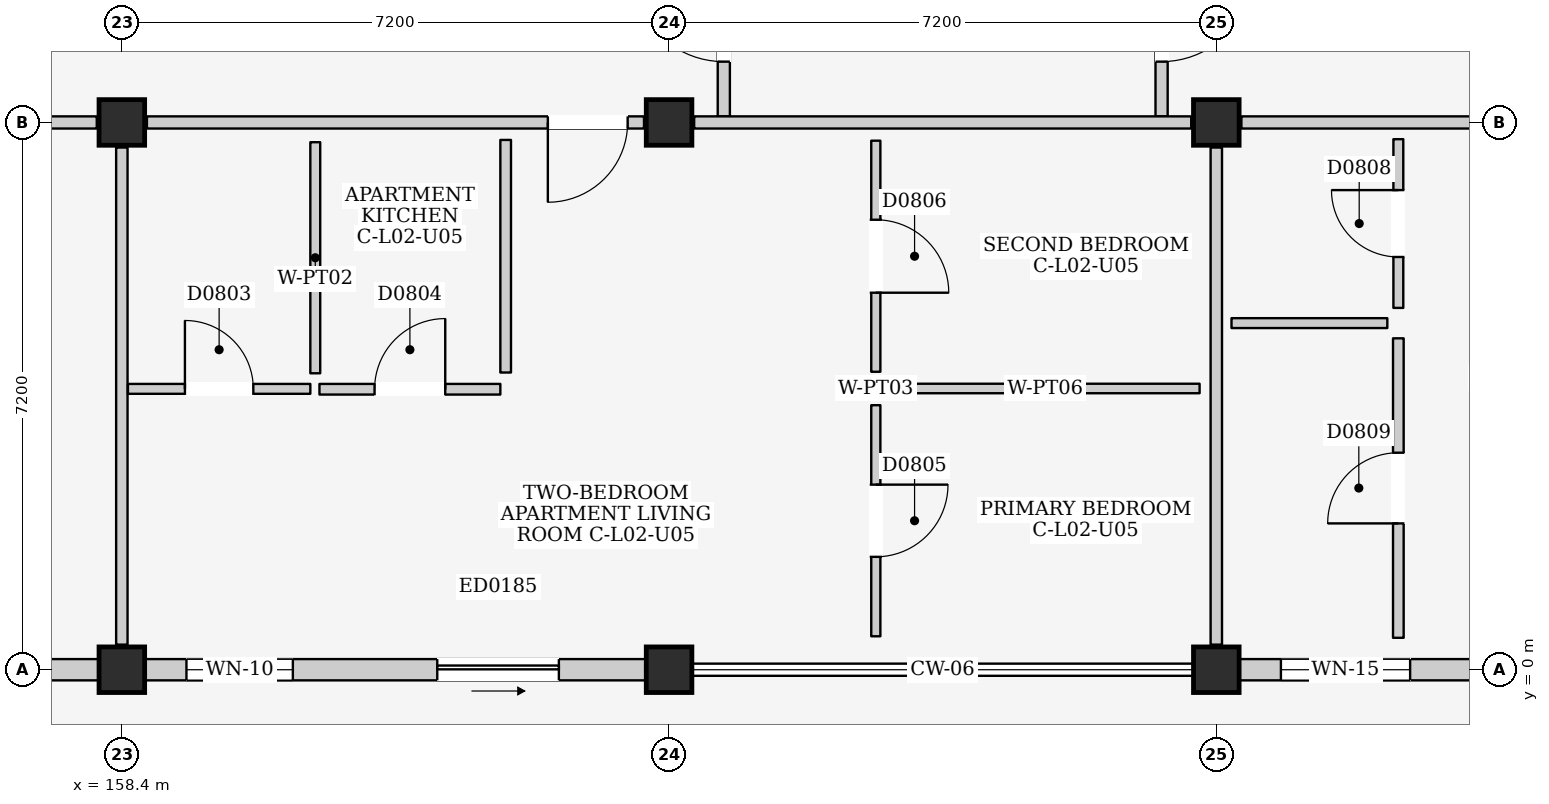
"""IFC4 building model, lengths in metres.
Left out: names, types, materials, properties, quantities, classifications, styles, units other than length and angle.
Written with IfcOpenShell. Run it as: python <this file> out.ifc"""

import sys

from ifc_helpers import new_model, si_unit, direction, frame, frame_2d, origin, origin_2d, place, context, subcontext, project, spatial, rectangle, extrude, element, fill, save


model = new_model("IFC4")
c1 = context("Model", 3, precision=1e-05, world=origin(), true_north=direction((0.0, 1.0)))
c2 = subcontext(c1, "Body", "Model", "MODEL_VIEW")
j1 = project(units=[si_unit("LENGTHUNIT", "METRE"), si_unit("PLANEANGLEUNIT", "RADIAN")], contexts=[c1])
p1 = place(None, origin())
s1 = spatial("IfcSite", under=j1, at=p1, CompositionType="ELEMENT")
p2 = place(p1, origin())
s2 = spatial("IfcBuilding", under=s1, at=p2, CompositionType="ELEMENT")
p3 = place(p2, frame((0.0, 0.0, 9.0)))
s3 = spatial("IfcBuildingStorey", under=s2, at=p3, CompositionType="ELEMENT", Elevation=9.0)
for number, where, z_axis, x_axis in (
    (1, (158.4, 0.0, 0.0), (0.0, 0.0, 1.0), (1.0, 0.0, 0.0)),
    (2, (158.4, 7.2, 0.0), (0.0, 0.0, 1.0), (1.0, 0.0, 0.0)),
    (3, (165.6, 0.0, 0.0), (0.0, 0.0, 1.0), (1.0, 0.0, 0.0)),
    (4, (165.6, 7.2, 0.0), (0.0, 0.0, 1.0), (1.0, 0.0, 0.0)),
    (5, (172.8, 0.0, 0.0), (0.0, 0.0, 1.0), (1.0, 0.0, 0.0)),
    (6, (172.8, 7.2, 0.0), (0.0, 0.0, 1.0), (1.0, 0.0, 0.0)),
):
    element("IfcColumn", number, at=place(p3, frame(where, z_axis=z_axis, x_axis=x_axis)), inside=s3, PredefinedType="COLUMN", context=c2, shape_type="SweptSolid", body=[
        extrude(rectangle(XDim=0.6, YDim=0.6, at=origin_2d()), origin(), (0.0, 0.0, 1.0), 3.2),
    ])
p4 = place(p3, frame((151.5, 0.0, 0.0), z_axis=(0.0, 0.0, 1.0), x_axis=(1.0, 0.0, 0.0)))
e7 = element("IfcWall", 7, at=p4, inside=s3, PredefinedType="ELEMENTEDWALL", context=c2, shape_type="SweptSolid", body=[
    extrude(rectangle(XDim=6.6, YDim=0.28, at=frame_2d((3.3, 0.0))), origin(), (0.0, 0.0, 1.0), 2.425),
])
p5 = place(p4, frame((3.85, 0.0, 0.0)))
e8 = element("IfcOpeningElement", 8, at=p5, cuts=e7, PredefinedType="OPENING", context=c2, shape_type="SweptSolid", body=[
    extrude(rectangle(XDim=1.8, YDim=2.12, at=frame_2d((0.9, 1.06))), frame((0.0, 0.155, 0.0), z_axis=(0.0, -1.0, 0.0), x_axis=(1.0, 0.0, 0.0)), (0.0, 0.0, 1.0), 0.31),
])
p6 = place(p4, frame((0.55, 0.0, 0.665)))
e9 = element("IfcOpeningElement", 9, at=p6, cuts=e7, PredefinedType="OPENING", context=c2, shape_type="SweptSolid", body=[
    extrude(rectangle(XDim=2.1, YDim=1.65, at=frame_2d((1.05, 0.825))), frame((0.0, 0.155, 0.0), z_axis=(0.0, -1.0, 0.0), x_axis=(1.0, 0.0, 0.0)), (0.0, 0.0, 1.0), 0.31),
])
p7 = place(p3, frame((158.7, 0.0, 0.0), z_axis=(0.0, 0.0, 1.0), x_axis=(1.0, 0.0, 0.0)))
e10 = element("IfcWall", 10, at=p7, inside=s3, PredefinedType="ELEMENTEDWALL", context=c2, shape_type="SweptSolid", body=[
    extrude(rectangle(XDim=6.6, YDim=0.28, at=frame_2d((3.3, 0.0))), origin(), (0.0, 0.0, 1.0), 2.425),
])
p8 = place(p7, frame((3.85, 0.0, 0.0)))
e11 = element("IfcOpeningElement", 11, at=p8, cuts=e10, PredefinedType="OPENING", context=c2, shape_type="SweptSolid", body=[
    extrude(rectangle(XDim=1.6, YDim=2.12, at=frame_2d((0.8, 1.06))), frame((0.0, 0.155, 0.0), z_axis=(0.0, -1.0, 0.0), x_axis=(1.0, 0.0, 0.0)), (0.0, 0.0, 1.0), 0.31),
])
p9 = place(p7, frame((0.55, 0.0, 0.9)))
e12 = element("IfcOpeningElement", 12, at=p9, cuts=e10, PredefinedType="OPENING", context=c2, shape_type="SweptSolid", body=[
    extrude(rectangle(XDim=1.4, YDim=1.2, at=frame_2d((0.7, 0.6))), frame((0.0, 0.155, 0.0), z_axis=(0.0, -1.0, 0.0), x_axis=(1.0, 0.0, 0.0)), (0.0, 0.0, 1.0), 0.31),
])
p10 = place(p3, frame((173.1, 0.0, 0.0), z_axis=(0.0, 0.0, 1.0), x_axis=(1.0, 0.0, 0.0)))
e13 = element("IfcWall", 13, at=p10, inside=s3, PredefinedType="ELEMENTEDWALL", context=c2, shape_type="SweptSolid", body=[
    extrude(rectangle(XDim=6.6, YDim=0.28, at=frame_2d((3.3, 0.0))), origin(), (0.0, 0.0, 1.0), 2.425),
])
p11 = place(p10, frame((3.85, 0.0, 0.0)))
e14 = element("IfcOpeningElement", 14, at=p11, cuts=e13, PredefinedType="OPENING", context=c2, shape_type="SweptSolid", body=[
    extrude(rectangle(XDim=2.4, YDim=2.12, at=frame_2d((1.2, 1.06))), frame((0.0, 0.155, 0.0), z_axis=(0.0, -1.0, 0.0), x_axis=(1.0, 0.0, 0.0)), (0.0, 0.0, 1.0), 0.31),
])
p12 = place(p10, frame((0.55, 0.0, 0.865)))
e15 = element("IfcOpeningElement", 15, at=p12, cuts=e13, PredefinedType="OPENING", context=c2, shape_type="SweptSolid", body=[
    extrude(rectangle(XDim=1.7, YDim=1.45, at=frame_2d((0.85, 0.725))), frame((0.0, 0.155, 0.0), z_axis=(0.0, -1.0, 0.0), x_axis=(1.0, 0.0, 0.0)), (0.0, 0.0, 1.0), 0.31),
])
p13 = place(p3, frame((166.32, 7.28, 0.0), z_axis=(0.0, 0.0, 1.0), x_axis=(0.0, 1.0, 0.0)))
e16 = element("IfcWall", 16, at=p13, inside=s3, PredefinedType="PARTITIONING", context=c2, shape_type="SweptSolid", body=[
    extrude(rectangle(XDim=4.32, YDim=0.16, at=frame_2d((2.16, 0.0))), origin(), (0.0, 0.0, 1.0), 2.96),
])
p14 = place(p13, frame((0.72, 0.0, 0.0)))
e17 = element("IfcOpeningElement", 17, at=p14, cuts=e16, PredefinedType="OPENING", context=c2, shape_type="SweptSolid", body=[
    extrude(rectangle(XDim=1.2, YDim=2.2, at=frame_2d((0.6, 1.1))), frame((0.0, 0.095, 0.0), z_axis=(0.0, -1.0, 0.0), x_axis=(1.0, 0.0, 0.0)), (0.0, 0.0, 1.0), 0.19),
])
p15 = place(p3, frame((172.08, 7.28, 0.0), z_axis=(0.0, 0.0, 1.0), x_axis=(0.0, 1.0, 0.0)))
e18 = element("IfcWall", 18, at=p15, inside=s3, PredefinedType="PARTITIONING", context=c2, shape_type="SweptSolid", body=[
    extrude(rectangle(XDim=4.32, YDim=0.16, at=frame_2d((2.16, 0.0))), origin(), (0.0, 0.0, 1.0), 2.96),
])
p16 = place(p15, frame((0.72, 0.0, 0.0)))
e19 = element("IfcOpeningElement", 19, at=p16, cuts=e18, PredefinedType="OPENING", context=c2, shape_type="SweptSolid", body=[
    extrude(rectangle(XDim=1.2, YDim=2.2, at=frame_2d((0.6, 1.1))), frame((0.0, 0.095, 0.0), z_axis=(0.0, -1.0, 0.0), x_axis=(1.0, 0.0, 0.0)), (0.0, 0.0, 1.0), 0.19),
])
p17 = place(p3, frame((151.53, 7.2, 0.0), z_axis=(0.0, 0.0, 1.0), x_axis=(1.0, 0.0, 0.0)))
e20 = element("IfcWall", 20, at=p17, inside=s3, PredefinedType="PARTITIONING", context=c2, shape_type="SweptSolid", body=[
    extrude(rectangle(XDim=6.54, YDim=0.16, at=frame_2d((3.27, 0.0))), origin(), (0.0, 0.0, 1.0), 2.345),
])
p18 = place(p17, frame((4.095, 0.0, 0.0)))
e21 = element("IfcOpeningElement", 21, at=p18, cuts=e20, PredefinedType="OPENING", context=c2, shape_type="SweptSolid", body=[
    extrude(rectangle(XDim=1.05, YDim=2.15, at=frame_2d((0.525, 1.075))), frame((0.0, 0.095, 0.0), z_axis=(0.0, -1.0, 0.0), x_axis=(1.0, 0.0, 0.0)), (0.0, 0.0, 1.0), 0.19),
])
p19 = place(p3, frame((158.4, 0.33, 0.0), z_axis=(0.0, 0.0, 1.0), x_axis=(0.0, 1.0, 0.0)))
e22 = element("IfcWall", 22, at=p19, inside=s3, PredefinedType="PARTITIONING", context=c2, shape_type="SweptSolid", body=[
    extrude(rectangle(XDim=6.54, YDim=0.15, at=frame_2d((3.27, 0.0))), origin(), (0.0, 0.0, 1.0), 2.395),
])
p20 = place(p3, frame((158.73, 7.2, 0.0), z_axis=(0.0, 0.0, 1.0), x_axis=(1.0, 0.0, 0.0)))
e23 = element("IfcWall", 23, at=p20, inside=s3, PredefinedType="PARTITIONING", context=c2, shape_type="SweptSolid", body=[
    extrude(rectangle(XDim=6.54, YDim=0.16, at=frame_2d((3.27, 0.0))), origin(), (0.0, 0.0, 1.0), 2.345),
])
p21 = place(p20, frame((5.275, 0.0, 0.0)))
e24 = element("IfcOpeningElement", 24, at=p21, cuts=e23, PredefinedType="OPENING", context=c2, shape_type="SweptSolid", body=[
    extrude(rectangle(XDim=1.05, YDim=2.15, at=frame_2d((0.525, 1.075))), frame((0.0, 0.095, 0.0), z_axis=(0.0, -1.0, 0.0), x_axis=(1.0, 0.0, 0.0)), (0.0, 0.0, 1.0), 0.19),
])
p22 = place(p3, frame((165.93, 7.2, 0.0), z_axis=(0.0, 0.0, 1.0), x_axis=(1.0, 0.0, 0.0)))
e25 = element("IfcWall", 25, at=p22, inside=s3, PredefinedType="PARTITIONING", context=c2, shape_type="SweptSolid", body=[
    extrude(rectangle(XDim=6.54, YDim=0.16, at=frame_2d((3.27, 0.0))), origin(), (0.0, 0.0, 1.0), 2.345),
])
p23 = place(p3, frame((172.8, 0.33, 0.0), z_axis=(0.0, 0.0, 1.0), x_axis=(0.0, 1.0, 0.0)))
e26 = element("IfcWall", 26, at=p23, inside=s3, PredefinedType="PARTITIONING", context=c2, shape_type="SweptSolid", body=[
    extrude(rectangle(XDim=6.54, YDim=0.15, at=frame_2d((3.27, 0.0))), origin(), (0.0, 0.0, 1.0), 2.395),
])
p24 = place(p3, frame((158.48, 3.695, 0.0), z_axis=(0.0, 0.0, 1.0), x_axis=(1.0, 0.0, 0.0)))
e27 = element("IfcWall", 27, at=p24, inside=s3, PredefinedType="PARTITIONING", context=c2, shape_type="SweptSolid", body=[
    extrude(rectangle(XDim=2.4, YDim=0.13, at=frame_2d((1.2, 0.0))), origin(), (0.0, 0.0, 1.0), 2.96),
])
p25 = place(p24, frame((0.75, 0.0, 0.0)))
e28 = element("IfcOpeningElement", 28, at=p25, cuts=e27, PredefinedType="OPENING", context=c2, shape_type="SweptSolid", body=[
    extrude(rectangle(XDim=0.9, YDim=2.1, at=frame_2d((0.45, 1.05))), frame((0.0, 0.08, 0.0), z_axis=(0.0, -1.0, 0.0), x_axis=(1.0, 0.0, 0.0)), (0.0, 0.0, 1.0), 0.16),
])
p26 = place(p3, frame((160.945, 3.9, 0.0), z_axis=(0.0, 0.0, 1.0), x_axis=(0.0, 1.0, 0.0)))
e29 = element("IfcWall", 29, at=p26, inside=s3, PredefinedType="PARTITIONING", context=c2, shape_type="SweptSolid", body=[
    extrude(rectangle(XDim=3.04, YDim=0.13, at=frame_2d((1.52, 0.0))), origin(), (0.0, 0.0, 1.0), 2.96),
])
p27 = place(p3, frame((161.0, 3.69, 0.0), z_axis=(0.0, 0.0, 1.0), x_axis=(1.0, 0.0, 0.0)))
e30 = element("IfcWall", 30, at=p27, inside=s3, PredefinedType="PARTITIONING", context=c2, shape_type="SweptSolid", body=[
    extrude(rectangle(XDim=2.38, YDim=0.14, at=frame_2d((1.19, 0.0))), origin(), (0.0, 0.0, 1.0), 2.96),
])
p28 = place(p27, frame((0.725, 0.0, 0.0)))
e31 = element("IfcOpeningElement", 31, at=p28, cuts=e30, PredefinedType="OPENING", context=c2, shape_type="SweptSolid", body=[
    extrude(rectangle(XDim=0.93, YDim=2.14, at=frame_2d((0.465, 1.07))), frame((0.0, 0.085, 0.0), z_axis=(0.0, -1.0, 0.0), x_axis=(1.0, 0.0, 0.0)), (0.0, 0.0, 1.0), 0.17),
])
p29 = place(p3, frame((163.45, 3.91, 0.0), z_axis=(0.0, 0.0, 1.0), x_axis=(0.0, 1.0, 0.0)))
e32 = element("IfcWall", 32, at=p29, inside=s3, PredefinedType="PARTITIONING", context=c2, shape_type="SweptSolid", body=[
    extrude(rectangle(XDim=3.06, YDim=0.14, at=frame_2d((1.53, 0.0))), origin(), (0.0, 0.0, 1.0), 2.96),
])
p30 = place(p3, frame((168.32, 0.44, 0.0), z_axis=(0.0, 0.0, 1.0), x_axis=(0.0, 1.0, 0.0)))
e33 = element("IfcWall", 33, at=p30, inside=s3, PredefinedType="PARTITIONING", context=c2, shape_type="SweptSolid", body=[
    extrude(rectangle(XDim=3.04, YDim=0.12, at=frame_2d((1.52, 0.0))), origin(), (0.0, 0.0, 1.0), 2.96),
])
p31 = place(p30, frame((1.045, 0.0, 0.0)))
e34 = element("IfcOpeningElement", 34, at=p31, cuts=e33, PredefinedType="OPENING", context=c2, shape_type="SweptSolid", body=[
    extrude(rectangle(XDim=0.95, YDim=2.15, at=frame_2d((0.475, 1.075))), frame((0.0, 0.075, 0.0), z_axis=(0.0, -1.0, 0.0), x_axis=(1.0, 0.0, 0.0)), (0.0, 0.0, 1.0), 0.15),
])
p32 = place(p3, frame((168.52, 3.7, 0.0), z_axis=(0.0, 0.0, 1.0), x_axis=(1.0, 0.0, 0.0)))
e35 = element("IfcWall", 35, at=p32, inside=s3, PredefinedType="PARTITIONING", context=c2, shape_type="SweptSolid", body=[
    extrude(rectangle(XDim=4.06, YDim=0.125, at=frame_2d((2.03, 0.0))), origin(), (0.0, 0.0, 1.0), 2.96),
])
p33 = place(p3, frame((168.32, 3.92, 0.0), z_axis=(0.0, 0.0, 1.0), x_axis=(0.0, 1.0, 0.0)))
e36 = element("IfcWall", 36, at=p33, inside=s3, PredefinedType="PARTITIONING", context=c2, shape_type="SweptSolid", body=[
    extrude(rectangle(XDim=3.04, YDim=0.12, at=frame_2d((1.52, 0.0))), origin(), (0.0, 0.0, 1.0), 2.96),
])
p34 = place(p33, frame((1.04, 0.0, 0.0)))
e37 = element("IfcOpeningElement", 37, at=p34, cuts=e36, PredefinedType="OPENING", context=c2, shape_type="SweptSolid", body=[
    extrude(rectangle(XDim=0.96, YDim=2.15, at=frame_2d((0.48, 1.075))), frame((0.0, 0.075, 0.0), z_axis=(0.0, -1.0, 0.0), x_axis=(1.0, 0.0, 0.0)), (0.0, 0.0, 1.0), 0.15),
])
p35 = place(p3, frame((173.13, 7.2, 0.0), z_axis=(0.0, 0.0, 1.0), x_axis=(1.0, 0.0, 0.0)))
e38 = element("IfcWall", 38, at=p35, inside=s3, PredefinedType="PARTITIONING", context=c2, shape_type="SweptSolid", body=[
    extrude(rectangle(XDim=6.54, YDim=0.16, at=frame_2d((3.27, 0.0))), origin(), (0.0, 0.0, 1.0), 2.345),
])
p36 = place(p35, frame((4.095, 0.0, 0.0)))
e39 = element("IfcOpeningElement", 39, at=p36, cuts=e38, PredefinedType="OPENING", context=c2, shape_type="SweptSolid", body=[
    extrude(rectangle(XDim=1.05, YDim=2.15, at=frame_2d((0.525, 1.075))), frame((0.0, 0.095, 0.0), z_axis=(0.0, -1.0, 0.0), x_axis=(1.0, 0.0, 0.0)), (0.0, 0.0, 1.0), 0.19),
])
p37 = place(p3, frame((173.0, 4.56, 0.0), z_axis=(0.0, 0.0, 1.0), x_axis=(1.0, 0.0, 0.0)))
e40 = element("IfcWall", 40, at=p37, inside=s3, PredefinedType="PARTITIONING", context=c2, shape_type="SweptSolid", body=[
    extrude(rectangle(XDim=2.05, YDim=0.13, at=frame_2d((1.025, 0.0))), origin(), (0.0, 0.0, 1.0), 2.96),
])
p38 = place(p3, frame((175.195, 4.76, 0.0), z_axis=(0.0, 0.0, 1.0), x_axis=(0.0, 1.0, 0.0)))
e41 = element("IfcWall", 41, at=p38, inside=s3, PredefinedType="PARTITIONING", context=c2, shape_type="SweptSolid", body=[
    extrude(rectangle(XDim=2.22, YDim=0.13, at=frame_2d((1.11, 0.0))), origin(), (0.0, 0.0, 1.0), 2.96),
])
p39 = place(p38, frame((0.67, 0.0, 0.0)))
e42 = element("IfcOpeningElement", 42, at=p39, cuts=e41, PredefinedType="OPENING", context=c2, shape_type="SweptSolid", body=[
    extrude(rectangle(XDim=0.88, YDim=2.1, at=frame_2d((0.44, 1.05))), frame((0.0, 0.08, 0.0), z_axis=(0.0, -1.0, 0.0), x_axis=(1.0, 0.0, 0.0)), (0.0, 0.0, 1.0), 0.16),
])
p40 = place(p3, frame((175.195, 0.42, 0.0), z_axis=(0.0, 0.0, 1.0), x_axis=(0.0, 1.0, 0.0)))
e43 = element("IfcWall", 43, at=p40, inside=s3, PredefinedType="PARTITIONING", context=c2, shape_type="SweptSolid", body=[
    extrude(rectangle(XDim=3.94, YDim=0.14, at=frame_2d((1.97, 0.0))), origin(), (0.0, 0.0, 1.0), 2.96),
])
p41 = place(p40, frame((1.505, 0.0, 0.0)))
e44 = element("IfcOpeningElement", 44, at=p41, cuts=e43, PredefinedType="OPENING", context=c2, shape_type="SweptSolid", body=[
    extrude(rectangle(XDim=0.93, YDim=2.14, at=frame_2d((0.465, 1.07))), frame((0.0, 0.085, 0.0), z_axis=(0.0, -1.0, 0.0), x_axis=(1.0, 0.0, 0.0)), (0.0, 0.0, 1.0), 0.17),
])
p42 = place(p8, frame((1.6, 0.0, 0.0), z_axis=(0.0, 0.0, 1.0), x_axis=(-1.0, 0.0, 0.0)))
e45 = element("IfcDoor", 45, at=p42, inside=s3, OperationType="SLIDING_TO_RIGHT", PredefinedType="DOOR", context=c2, shape_type="SweptSolid", body=[
    extrude(rectangle(XDim=1.6, YDim=2.12, at=frame_2d((0.8, 1.06))), frame((0.0, 0.025, 0.0), z_axis=(0.0, -1.0, 0.0), x_axis=(1.0, 0.0, 0.0)), (0.0, 0.0, 1.0), 0.05),
])
fill(e11, e45)
p43 = place(p9, origin())
e46 = element("IfcWindow", 46, at=p43, inside=s3, PartitioningType="DOUBLE_PANEL_HORIZONTAL", PredefinedType="WINDOW", context=c2, shape_type="SweptSolid", body=[
    extrude(rectangle(XDim=1.4, YDim=1.2, at=frame_2d((0.7, 0.6))), frame((0.0, 0.03, 0.0), z_axis=(0.0, -1.0, 0.0), x_axis=(1.0, 0.0, 0.0)), (0.0, 0.0, 1.0), 0.06),
])
fill(e12, e46)
p44 = place(p12, origin())
e47 = element("IfcWindow", 47, at=p44, inside=s3, PartitioningType="DOUBLE_PANEL_VERTICAL", PredefinedType="WINDOW", context=c2, shape_type="SweptSolid", body=[
    extrude(rectangle(XDim=1.7, YDim=1.45, at=frame_2d((0.85, 0.725))), frame((0.0, 0.03, 0.0), z_axis=(0.0, -1.0, 0.0), x_axis=(1.0, 0.0, 0.0)), (0.0, 0.0, 1.0), 0.06),
])
fill(e15, e47)
p45 = place(p14, origin())
e48 = element("IfcDoor", 48, at=p45, inside=s3, OperationType="SINGLE_SWING_RIGHT", PredefinedType="DOOR", context=c2, shape_type="SweptSolid", body=[
    extrude(rectangle(XDim=1.2, YDim=2.2, at=frame_2d((0.6, 1.1))), frame((0.0, 0.025, 0.0), z_axis=(0.0, -1.0, 0.0), x_axis=(1.0, 0.0, 0.0)), (0.0, 0.0, 1.0), 0.05),
])
fill(e17, e48)
p46 = place(p16, frame((1.2, 0.0, 0.0), z_axis=(0.0, 0.0, 1.0), x_axis=(-1.0, 0.0, 0.0)))
e49 = element("IfcDoor", 49, at=p46, inside=s3, OperationType="SINGLE_SWING_LEFT", PredefinedType="DOOR", context=c2, shape_type="SweptSolid", body=[
    extrude(rectangle(XDim=1.2, YDim=2.2, at=frame_2d((0.6, 1.1))), frame((0.0, 0.025, 0.0), z_axis=(0.0, -1.0, 0.0), x_axis=(1.0, 0.0, 0.0)), (0.0, 0.0, 1.0), 0.05),
])
fill(e19, e49)
p47 = place(p21, frame((1.05, 0.0, 0.0), z_axis=(0.0, 0.0, 1.0), x_axis=(-1.0, 0.0, 0.0)))
e50 = element("IfcDoor", 50, at=p47, inside=s3, OperationType="SINGLE_SWING_RIGHT", PredefinedType="DOOR", context=c2, shape_type="SweptSolid", body=[
    extrude(rectangle(XDim=1.05, YDim=2.15, at=frame_2d((0.525, 1.075))), frame((0.0, 0.025, 0.0), z_axis=(0.0, -1.0, 0.0), x_axis=(1.0, 0.0, 0.0)), (0.0, 0.0, 1.0), 0.05),
])
fill(e24, e50)
p48 = place(p25, origin())
e51 = element("IfcDoor", 51, at=p48, inside=s3, OperationType="SINGLE_SWING_LEFT", PredefinedType="DOOR", context=c2, shape_type="SweptSolid", body=[
    extrude(rectangle(XDim=0.9, YDim=2.1, at=frame_2d((0.45, 1.05))), frame((0.0, 0.025, 0.0), z_axis=(0.0, -1.0, 0.0), x_axis=(1.0, 0.0, 0.0)), (0.0, 0.0, 1.0), 0.05),
])
fill(e28, e51)
p49 = place(p28, origin())
e52 = element("IfcDoor", 52, at=p49, inside=s3, OperationType="SINGLE_SWING_RIGHT", PredefinedType="DOOR", context=c2, shape_type="SweptSolid", body=[
    extrude(rectangle(XDim=0.93, YDim=2.14, at=frame_2d((0.465, 1.07))), frame((0.0, 0.025, 0.0), z_axis=(0.0, -1.0, 0.0), x_axis=(1.0, 0.0, 0.0)), (0.0, 0.0, 1.0), 0.05),
])
fill(e31, e52)
p50 = place(p31, frame((0.95, 0.0, 0.0), z_axis=(0.0, 0.0, 1.0), x_axis=(-1.0, 0.0, 0.0)))
e53 = element("IfcDoor", 53, at=p50, inside=s3, OperationType="SINGLE_SWING_LEFT", PredefinedType="DOOR", context=c2, shape_type="SweptSolid", body=[
    extrude(rectangle(XDim=0.95, YDim=2.15, at=frame_2d((0.475, 1.075))), frame((0.0, 0.025, 0.0), z_axis=(0.0, -1.0, 0.0), x_axis=(1.0, 0.0, 0.0)), (0.0, 0.0, 1.0), 0.05),
])
fill(e34, e53)
p51 = place(p34, frame((0.96, 0.0, 0.0), z_axis=(0.0, 0.0, 1.0), x_axis=(-1.0, 0.0, 0.0)))
e54 = element("IfcDoor", 54, at=p51, inside=s3, OperationType="SINGLE_SWING_RIGHT", PredefinedType="DOOR", context=c2, shape_type="SweptSolid", body=[
    extrude(rectangle(XDim=0.96, YDim=2.15, at=frame_2d((0.48, 1.075))), frame((0.0, 0.025, 0.0), z_axis=(0.0, -1.0, 0.0), x_axis=(1.0, 0.0, 0.0)), (0.0, 0.0, 1.0), 0.05),
])
fill(e37, e54)
p52 = place(p39, origin())
e55 = element("IfcDoor", 55, at=p52, inside=s3, OperationType="SINGLE_SWING_RIGHT", PredefinedType="DOOR", context=c2, shape_type="SweptSolid", body=[
    extrude(rectangle(XDim=0.88, YDim=2.1, at=frame_2d((0.44, 1.05))), frame((0.0, 0.025, 0.0), z_axis=(0.0, -1.0, 0.0), x_axis=(1.0, 0.0, 0.0)), (0.0, 0.0, 1.0), 0.05),
])
fill(e42, e55)
p53 = place(p41, origin())
e56 = element("IfcDoor", 56, at=p53, inside=s3, OperationType="SINGLE_SWING_LEFT", PredefinedType="DOOR", context=c2, shape_type="SweptSolid", body=[
    extrude(rectangle(XDim=0.93, YDim=2.14, at=frame_2d((0.465, 1.07))), frame((0.0, 0.025, 0.0), z_axis=(0.0, -1.0, 0.0), x_axis=(1.0, 0.0, 0.0)), (0.0, 0.0, 1.0), 0.05),
])
fill(e44, e56)
save(model, sys.argv[1])
